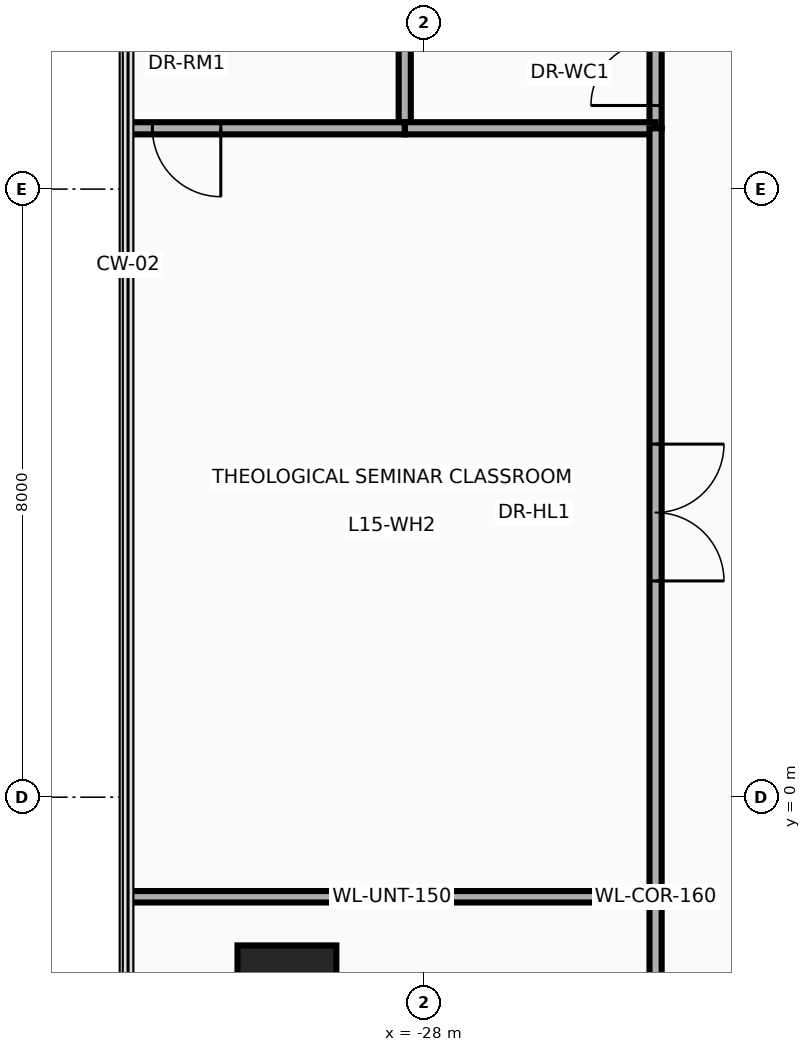
"""IFC4 building model, lengths in metres.
Left out: names, types, materials, properties, quantities, classifications, styles, units other than length and angle.
Written with IfcOpenShell. Run it as: python <this file> out.ifc"""

import sys

from ifc_helpers import new_model, si_unit, direction, frame, frame_2d, origin, origin_2d, place, context, subcontext, project, spatial, rectangle, circle, extrude, source, transform, mapped, element, fill, save


model = new_model("IFC4")
c1 = context("Model", 3, precision=1e-05, world=origin(), true_north=direction((0.0, 1.0)))
c2 = subcontext(c1, "Body", "Model", "MODEL_VIEW")
j1 = project(units=[si_unit("LENGTHUNIT", "METRE"), si_unit("PLANEANGLEUNIT", "RADIAN")], contexts=[c1])
p1 = place(None, origin())
s1 = spatial("IfcSite", under=j1, at=p1, CompositionType="ELEMENT")
p2 = place(p1, origin())
s2 = spatial("IfcBuilding", under=s1, at=p2, CompositionType="ELEMENT")
p3 = place(p2, frame((0.0, 0.0, 63.0)))
s3 = spatial("IfcBuildingStorey", under=s2, at=p3, CompositionType="ELEMENT", Elevation=63.0)
m1 = source(origin(), c2, "Body", "SweptSolid", [
    extrude(circle(Radius=0.65, at=origin_2d()), origin(), (0.0, 0.0, 1.0), 3.7),
])
p4 = place(p3, frame((-29.8, -2.6, 0.0), z_axis=(0.0, 0.0, 1.0), x_axis=(1.0, 0.0, 0.0)))
e1 = element("IfcColumn", 1, at=p4, inside=s3, PredefinedType="COLUMN", context=c2, shape_type="MappedRepresentation", body=[
    mapped(m1, transform((0.0, 0.0, 0.0), x_axis=(1.0, 0.0, 0.0), y_axis=(0.0, 1.0, 0.0), z_axis=(0.0, 0.0, 1.0), scale=1.0)),
])
p5 = place(p3, frame((-28.25, 8.8, 0.0), z_axis=(0.0, 0.0, 1.0), x_axis=(0.0, 1.0, 0.0)))
e2 = element("IfcWall", 2, at=p5, inside=s3, PredefinedType="PARTITIONING", context=c2, shape_type="SweptSolid", body=[
    extrude(rectangle(XDim=2.6, YDim=0.16, at=frame_2d((1.3, 0.0))), origin(), (0.0, 0.0, 1.0), 2.583),
])
p6 = place(p3, frame((-24.95, 8.8, 0.0), z_axis=(0.0, 0.0, 1.0), x_axis=(0.0, 1.0, 0.0)))
e3 = element("IfcWall", 3, at=p6, inside=s3, PredefinedType="PARTITIONING", context=c2, shape_type="SweptSolid", body=[
    extrude(rectangle(XDim=2.6, YDim=0.16, at=frame_2d((1.3, 0.0))), origin(), (0.0, 0.0, 1.0), 2.583),
])
p7 = place(p6, frame((0.3, 0.0, 0.0)))
e4 = element("IfcOpeningElement", 4, at=p7, cuts=e3, PredefinedType="OPENING", context=c2, shape_type="SweptSolid", body=[
    extrude(rectangle(XDim=0.85, YDim=2.1, at=frame_2d((0.425, 1.05))), frame((0.0, 0.095, 0.0), z_axis=(0.0, -1.0, 0.0), x_axis=(1.0, 0.0, 0.0)), (0.0, 0.0, 1.0), 0.19),
])
p8 = place(p6, frame((1.45, 0.0, 0.0)))
e5 = element("IfcOpeningElement", 5, at=p8, cuts=e3, PredefinedType="OPENING", context=c2, shape_type="SweptSolid", body=[
    extrude(rectangle(XDim=0.85, YDim=2.1, at=frame_2d((0.425, 1.05))), frame((0.0, 0.095, 0.0), z_axis=(0.0, -1.0, 0.0), x_axis=(1.0, 0.0, 0.0)), (0.0, 0.0, 1.0), 0.19),
])
p9 = place(p3, frame((-28.25, 8.8, 0.0), z_axis=(0.0, 0.0, 1.0), x_axis=(1.0, 0.0, 0.0)))
e6 = element("IfcWall", 6, at=p9, inside=s3, PredefinedType="PARTITIONING", context=c2, shape_type="SweptSolid", body=[
    extrude(rectangle(XDim=3.3, YDim=0.16, at=frame_2d((1.65, 0.0))), origin(), (0.0, 0.0, 1.0), 3.46),
])
p10 = place(p3, frame((-24.95, -11.42, 0.0), z_axis=(0.0, 0.0, 1.0), x_axis=(0.0, 1.0, 0.0)))
e7 = element("IfcWall", 7, at=p10, inside=s3, PredefinedType="PARTITIONING", context=c2, shape_type="SweptSolid", body=[
    extrude(rectangle(XDim=20.22, YDim=0.16, at=frame_2d((10.11, 0.0))), origin(), (0.0, 0.0, 1.0), 2.583),
])
p11 = place(p10, frame((4.155, 0.0, 0.0)))
e8 = element("IfcOpeningElement", 8, at=p11, cuts=e7, PredefinedType="OPENING", context=c2, shape_type="SweptSolid", body=[
    extrude(rectangle(XDim=1.8, YDim=2.15, at=frame_2d((0.9, 1.075))), frame((0.0, 0.095, 0.0), z_axis=(0.0, -1.0, 0.0), x_axis=(1.0, 0.0, 0.0)), (0.0, 0.0, 1.0), 0.19),
])
p12 = place(p10, frame((14.265, 0.0, 0.0)))
e9 = element("IfcOpeningElement", 9, at=p12, cuts=e7, PredefinedType="OPENING", context=c2, shape_type="SweptSolid", body=[
    extrude(rectangle(XDim=1.8, YDim=2.15, at=frame_2d((0.9, 1.075))), frame((0.0, 0.095, 0.0), z_axis=(0.0, -1.0, 0.0), x_axis=(1.0, 0.0, 0.0)), (0.0, 0.0, 1.0), 0.19),
])
p13 = place(p3, frame((-31.89, 8.8, 0.0), z_axis=(0.0, 0.0, 1.0), x_axis=(1.0, 0.0, 0.0)))
e10 = element("IfcWall", 10, at=p13, inside=s3, PredefinedType="PARTITIONING", context=c2, shape_type="SweptSolid", body=[
    extrude(rectangle(XDim=3.64, YDim=0.16, at=frame_2d((1.82, 0.0))), origin(), (0.0, 0.0, 1.0), 2.896),
])
p14 = place(p13, frame((0.32, 0.0, 0.0)))
e11 = element("IfcOpeningElement", 11, at=p14, cuts=e10, PredefinedType="OPENING", context=c2, shape_type="SweptSolid", body=[
    extrude(rectangle(XDim=0.9, YDim=2.1, at=frame_2d((0.45, 1.05))), frame((0.0, 0.095, 0.0), z_axis=(0.0, -1.0, 0.0), x_axis=(1.0, 0.0, 0.0)), (0.0, 0.0, 1.0), 0.19),
])
p15 = place(p3, frame((-31.89, -1.31, 0.0), z_axis=(0.0, 0.0, 1.0), x_axis=(1.0, 0.0, 0.0)))
e12 = element("IfcWall", 12, at=p15, inside=s3, PredefinedType="PARTITIONING", context=c2, shape_type="SweptSolid", body=[
    extrude(rectangle(XDim=6.94, YDim=0.15, at=frame_2d((3.47, 0.0))), origin(), (0.0, 0.0, 1.0), 2.896),
])
p16 = place(p7, origin())
e13 = element("IfcDoor", 13, at=p16, inside=s3, OperationType="SINGLE_SWING_LEFT", PredefinedType="DOOR", context=c2, shape_type="SweptSolid", body=[
    extrude(rectangle(XDim=0.85, YDim=2.1, at=frame_2d((0.425, 1.05))), frame((0.0, 0.025, 0.0), z_axis=(0.0, -1.0, 0.0), x_axis=(1.0, 0.0, 0.0)), (0.0, 0.0, 1.0), 0.05),
])
fill(e4, e13)
p17 = place(p14, frame((0.9, 0.0, 0.0), z_axis=(0.0, 0.0, 1.0), x_axis=(-1.0, 0.0, 0.0)))
e14 = element("IfcDoor", 14, at=p17, inside=s3, OperationType="SINGLE_SWING_LEFT", PredefinedType="DOOR", context=c2, shape_type="SweptSolid", body=[
    extrude(rectangle(XDim=0.9, YDim=2.1, at=frame_2d((0.45, 1.05))), frame((0.0, 0.025, 0.0), z_axis=(0.0, -1.0, 0.0), x_axis=(1.0, 0.0, 0.0)), (0.0, 0.0, 1.0), 0.05),
])
fill(e11, e14)
p18 = place(p12, frame((1.8, 0.0, 0.0), z_axis=(0.0, 0.0, 1.0), x_axis=(-1.0, 0.0, 0.0)))
e15 = element("IfcDoor", 15, at=p18, inside=s3, OperationType="DOUBLE_DOOR_SINGLE_SWING", PredefinedType="DOOR", context=c2, shape_type="SweptSolid", body=[
    extrude(rectangle(XDim=1.8, YDim=2.15, at=frame_2d((0.9, 1.075))), frame((0.0, 0.025, 0.0), z_axis=(0.0, -1.0, 0.0), x_axis=(1.0, 0.0, 0.0)), (0.0, 0.0, 1.0), 0.05),
])
fill(e9, e15)
save(model, sys.argv[1])
